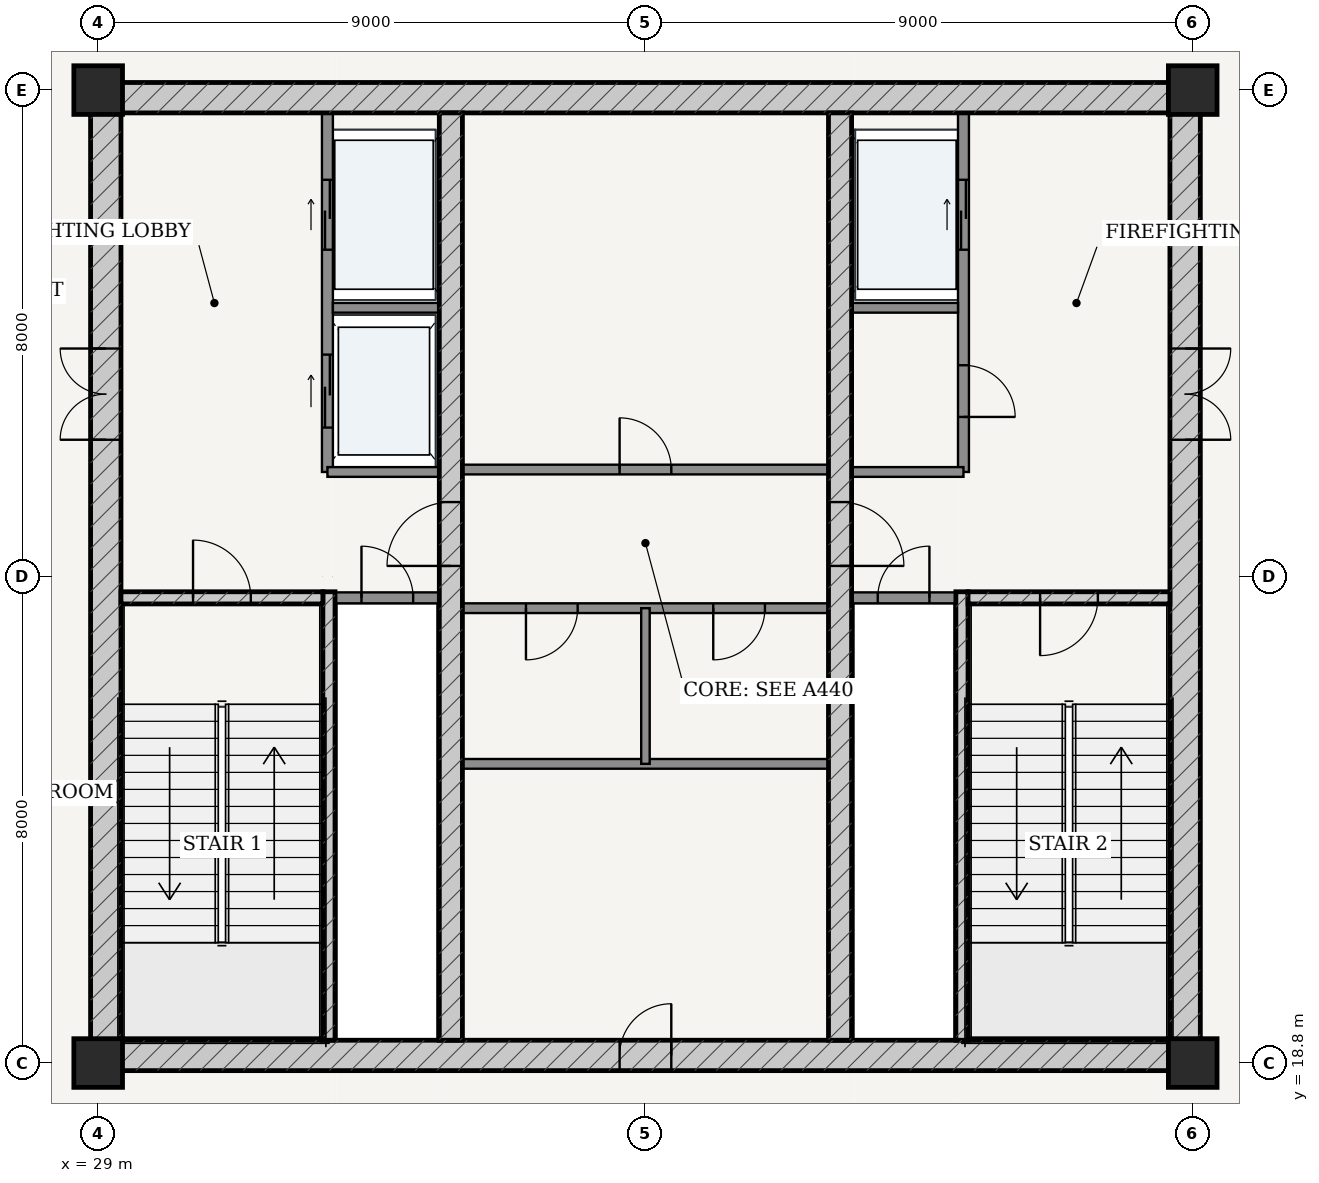
"""IFC4 building model, lengths in metres.
Left out: names, types, materials, properties, quantities, classifications, styles, units other than length and angle.
Written with IfcOpenShell. Run it as: python <this file> out.ifc"""

import sys

from ifc_helpers import new_model, si_unit, direction, frame, frame_2d, origin, origin_2d, place, context, subcontext, project, spatial, rectangle, extrude, source, transform, mapped, element, fill, save


model = new_model("IFC4")
c1 = context("Model", 3, precision=1e-05, world=origin(), true_north=direction((-0.2419218956, 0.970295726276)))
c2 = subcontext(c1, "Body", "Model", "MODEL_VIEW")
j1 = project(units=[si_unit("LENGTHUNIT", "METRE"), si_unit("PLANEANGLEUNIT", "RADIAN")], contexts=[c1])
p1 = place(None, origin())
s1 = spatial("IfcSite", under=j1, at=p1, CompositionType="ELEMENT")
p2 = place(p1, origin())
s2 = spatial("IfcBuilding", under=s1, at=p2, CompositionType="ELEMENT")
p3 = place(p2, frame((0.0, 0.0, 316.5)))
s3 = spatial("IfcBuildingStorey", under=s2, at=p3, CompositionType="ELEMENT", Elevation=316.5)
for number, where, z_axis, x_axis in (
    (1, (29.0, 18.8, 0.0), (0.0, 0.0, 1.0), (1.0, 0.0, 0.0)),
    (2, (47.0, 18.8, 0.0), (0.0, 0.0, 1.0), (1.0, 0.0, 0.0)),
    (3, (47.0, 34.8, 0.0), (0.0, 0.0, 1.0), (1.0, 0.0, 0.0)),
    (4, (29.0, 34.8, 0.0), (0.0, 0.0, 1.0), (1.0, 0.0, 0.0)),
):
    element("IfcColumn", number, at=place(p3, frame(where, z_axis=z_axis, x_axis=x_axis)), inside=s3, PredefinedType="COLUMN", context=c2, shape_type="SweptSolid", body=[
        extrude(rectangle(XDim=0.8, YDim=0.8, at=origin_2d()), origin(), (0.0, 0.0, 1.0), 5.2),
    ])
p4 = place(p3, frame((28.875, 18.925, 0.0), z_axis=(0.0, 0.0, 1.0), x_axis=(1.0, 0.0, 0.0)))
e5 = element("IfcWall", 5, at=p4, inside=s3, PredefinedType="SHEAR", context=c2, shape_type="SweptSolid", body=[
    extrude(rectangle(XDim=18.25, YDim=0.5, at=frame_2d((9.125, 0.0))), origin(), (0.0, 0.0, 1.0), 4.78),
])
p5 = place(p4, frame((8.7, 0.0, 0.0)))
e6 = element("IfcOpeningElement", 6, at=p5, cuts=e5, PredefinedType="OPENING", context=c2, shape_type="SweptSolid", body=[
    extrude(rectangle(XDim=0.85, YDim=2.1, at=frame_2d((0.425, 1.05))), frame((0.0, 0.26, 0.0), z_axis=(0.0, -1.0, 0.0), x_axis=(1.0, 0.0, 0.0)), (0.0, 0.0, 1.0), 0.52),
])
p6 = place(p3, frame((28.875, 34.675, 0.0), z_axis=(0.0, 0.0, 1.0), x_axis=(1.0, 0.0, 0.0)))
e7 = element("IfcWall", 7, at=p6, inside=s3, PredefinedType="SHEAR", context=c2, shape_type="SweptSolid", body=[
    extrude(rectangle(XDim=18.25, YDim=0.5, at=frame_2d((9.125, 0.0))), origin(), (0.0, 0.0, 1.0), 4.78),
])
p7 = place(p3, frame((29.125, 19.175, 0.0), z_axis=(0.0, 0.0, 1.0), x_axis=(0.0, 1.0, 0.0)))
e8 = element("IfcWall", 8, at=p7, inside=s3, PredefinedType="SHEAR", context=c2, shape_type="SweptSolid", body=[
    extrude(rectangle(XDim=15.25, YDim=0.5, at=frame_2d((7.625, 0.0))), origin(), (0.0, 0.0, 1.0), 4.78),
])
p8 = place(p7, frame((9.875, 0.0, 0.0)))
e9 = element("IfcOpeningElement", 9, at=p8, cuts=e8, PredefinedType="OPENING", context=c2, shape_type="SweptSolid", body=[
    extrude(rectangle(XDim=1.5, YDim=2.2, at=frame_2d((0.75, 1.1))), frame((0.0, 0.26, 0.0), z_axis=(0.0, -1.0, 0.0), x_axis=(1.0, 0.0, 0.0)), (0.0, 0.0, 1.0), 0.52),
])
p9 = place(p3, frame((46.875, 19.175, 0.0), z_axis=(0.0, 0.0, 1.0), x_axis=(0.0, 1.0, 0.0)))
e10 = element("IfcWall", 10, at=p9, inside=s3, PredefinedType="SHEAR", context=c2, shape_type="SweptSolid", body=[
    extrude(rectangle(XDim=15.25, YDim=0.5, at=frame_2d((7.625, 0.0))), origin(), (0.0, 0.0, 1.0), 4.78),
])
p10 = place(p9, frame((9.875, 0.0, 0.0)))
e11 = element("IfcOpeningElement", 11, at=p10, cuts=e10, PredefinedType="OPENING", context=c2, shape_type="SweptSolid", body=[
    extrude(rectangle(XDim=1.5, YDim=2.2, at=frame_2d((0.75, 1.1))), frame((0.0, 0.26, 0.0), z_axis=(0.0, -1.0, 0.0), x_axis=(1.0, 0.0, 0.0)), (0.0, 0.0, 1.0), 0.52),
])
p11 = place(p3, frame((32.795, 19.175, 0.0), z_axis=(0.0, 0.0, 1.0), x_axis=(0.0, 1.0, 0.0)))
e12 = element("IfcWall", 12, at=p11, inside=s3, PredefinedType="SOLIDWALL", context=c2, shape_type="SweptSolid", body=[
    extrude(rectangle(XDim=7.375, YDim=0.2, at=frame_2d((3.688, 0.0))), origin(), (0.0, 0.0, 1.0), 4.78),
])
p12 = place(p3, frame((29.375, 26.45, 0.0), z_axis=(0.0, 0.0, 1.0), x_axis=(1.0, 0.0, 0.0)))
e13 = element("IfcWall", 13, at=p12, inside=s3, PredefinedType="SOLIDWALL", context=c2, shape_type="SweptSolid", body=[
    extrude(rectangle(XDim=3.32, YDim=0.2, at=frame_2d((1.66, 0.0))), origin(), (0.0, 0.0, 1.0), 4.78),
])
p13 = place(p12, frame((1.185, 0.0, 0.0)))
e14 = element("IfcOpeningElement", 14, at=p13, cuts=e13, PredefinedType="OPENING", context=c2, shape_type="SweptSolid", body=[
    extrude(rectangle(XDim=0.95, YDim=2.15, at=frame_2d((0.475, 1.075))), frame((0.0, 0.11, 0.0), z_axis=(0.0, -1.0, 0.0), x_axis=(1.0, 0.0, 0.0)), (0.0, 0.0, 1.0), 0.22),
])
p14 = place(p3, frame((43.205, 19.175, 0.0), z_axis=(0.0, 0.0, 1.0), x_axis=(0.0, 1.0, 0.0)))
e15 = element("IfcWall", 15, at=p14, inside=s3, PredefinedType="SOLIDWALL", context=c2, shape_type="SweptSolid", body=[
    extrude(rectangle(XDim=7.375, YDim=0.2, at=frame_2d((3.688, 0.0))), origin(), (0.0, 0.0, 1.0), 4.78),
])
p15 = place(p3, frame((43.305, 26.45, 0.0), z_axis=(0.0, 0.0, 1.0), x_axis=(1.0, 0.0, 0.0)))
e16 = element("IfcWall", 16, at=p15, inside=s3, PredefinedType="SOLIDWALL", context=c2, shape_type="SweptSolid", body=[
    extrude(rectangle(XDim=3.32, YDim=0.2, at=frame_2d((1.66, 0.0))), origin(), (0.0, 0.0, 1.0), 4.78),
])
p16 = place(p15, frame((1.185, 0.0, 0.0)))
e17 = element("IfcOpeningElement", 17, at=p16, cuts=e16, PredefinedType="OPENING", context=c2, shape_type="SweptSolid", body=[
    extrude(rectangle(XDim=0.95, YDim=2.15, at=frame_2d((0.475, 1.075))), frame((0.0, 0.11, 0.0), z_axis=(0.0, -1.0, 0.0), x_axis=(1.0, 0.0, 0.0)), (0.0, 0.0, 1.0), 0.22),
])
p17 = place(p3, frame((34.8, 19.175, 0.0), z_axis=(0.0, 0.0, 1.0), x_axis=(0.0, 1.0, 0.0)))
e18 = element("IfcWall", 18, at=p17, inside=s3, PredefinedType="SHEAR", context=c2, shape_type="SweptSolid", body=[
    extrude(rectangle(XDim=15.25, YDim=0.38, at=frame_2d((7.625, 0.0))), origin(), (0.0, 0.0, 1.0), 4.78),
])
p18 = place(p17, frame((7.8, 0.0, 0.0)))
e19 = element("IfcOpeningElement", 19, at=p18, cuts=e18, PredefinedType="OPENING", context=c2, shape_type="SweptSolid", body=[
    extrude(rectangle(XDim=1.05, YDim=2.15, at=frame_2d((0.525, 1.075))), frame((0.0, 0.2, 0.0), z_axis=(0.0, -1.0, 0.0), x_axis=(1.0, 0.0, 0.0)), (0.0, 0.0, 1.0), 0.4),
])
p19 = place(p3, frame((41.2, 19.175, 0.0), z_axis=(0.0, 0.0, 1.0), x_axis=(0.0, 1.0, 0.0)))
e20 = element("IfcWall", 20, at=p19, inside=s3, PredefinedType="SHEAR", context=c2, shape_type="SweptSolid", body=[
    extrude(rectangle(XDim=15.25, YDim=0.38, at=frame_2d((7.625, 0.0))), origin(), (0.0, 0.0, 1.0), 4.78),
])
p20 = place(p19, frame((7.8, 0.0, 0.0)))
e21 = element("IfcOpeningElement", 21, at=p20, cuts=e20, PredefinedType="OPENING", context=c2, shape_type="SweptSolid", body=[
    extrude(rectangle(XDim=1.05, YDim=2.15, at=frame_2d((0.525, 1.075))), frame((0.0, 0.2, 0.0), z_axis=(0.0, -1.0, 0.0), x_axis=(1.0, 0.0, 0.0)), (0.0, 0.0, 1.0), 0.4),
])
p21 = place(p3, frame((32.9, 26.45, 0.0), z_axis=(0.0, 0.0, 1.0), x_axis=(1.0, 0.0, 0.0)))
e22 = element("IfcWall", 22, at=p21, inside=s3, PredefinedType="PARTITIONING", context=c2, shape_type="SweptSolid", body=[
    extrude(rectangle(XDim=1.71, YDim=0.18, at=frame_2d((0.855, 0.0))), origin(), (0.0, 0.0, 1.0), 4.78),
])
p22 = place(p21, frame((0.43, 0.0, 0.0)))
e23 = element("IfcOpeningElement", 23, at=p22, cuts=e22, PredefinedType="OPENING", context=c2, shape_type="SweptSolid", body=[
    extrude(rectangle(XDim=0.85, YDim=2.1, at=frame_2d((0.425, 1.05))), frame((0.0, 0.1, 0.0), z_axis=(0.0, -1.0, 0.0), x_axis=(1.0, 0.0, 0.0)), (0.0, 0.0, 1.0), 0.2),
])
p23 = place(p3, frame((41.39, 26.45, 0.0), z_axis=(0.0, 0.0, 1.0), x_axis=(1.0, 0.0, 0.0)))
e24 = element("IfcWall", 24, at=p23, inside=s3, PredefinedType="PARTITIONING", context=c2, shape_type="SweptSolid", body=[
    extrude(rectangle(XDim=1.71, YDim=0.18, at=frame_2d((0.855, 0.0))), origin(), (0.0, 0.0, 1.0), 4.78),
])
p24 = place(p23, frame((0.43, 0.0, 0.0)))
e25 = element("IfcOpeningElement", 25, at=p24, cuts=e24, PredefinedType="OPENING", context=c2, shape_type="SweptSolid", body=[
    extrude(rectangle(XDim=0.85, YDim=2.1, at=frame_2d((0.425, 1.05))), frame((0.0, 0.1, 0.0), z_axis=(0.0, -1.0, 0.0), x_axis=(1.0, 0.0, 0.0)), (0.0, 0.0, 1.0), 0.2),
])
p25 = place(p3, frame((32.77, 28.52, 0.0), z_axis=(0.0, 0.0, 1.0), x_axis=(0.0, 1.0, 0.0)))
e26 = element("IfcWall", 26, at=p25, inside=s3, PredefinedType="PARTITIONING", context=c2, shape_type="SweptSolid", body=[
    extrude(rectangle(XDim=5.905, YDim=0.18, at=frame_2d((2.953, 0.0))), origin(), (0.0, 0.0, 1.0), 4.78),
])
p26 = place(p25, frame((3.655, 0.0, 0.0)))
e27 = element("IfcOpeningElement", 27, at=p26, cuts=e26, PredefinedType="OPENING", context=c2, shape_type="SweptSolid", body=[
    extrude(rectangle(XDim=1.15, YDim=2.2, at=frame_2d((0.575, 1.1))), frame((0.0, 0.1, 0.0), z_axis=(0.0, -1.0, 0.0), x_axis=(1.0, 0.0, 0.0)), (0.0, 0.0, 1.0), 0.2),
])
p27 = place(p25, frame((0.73, 0.0, 0.0)))
e28 = element("IfcOpeningElement", 28, at=p27, cuts=e26, PredefinedType="OPENING", context=c2, shape_type="SweptSolid", body=[
    extrude(rectangle(XDim=1.2, YDim=2.25, at=frame_2d((0.6, 1.125))), frame((0.0, 0.1, 0.0), z_axis=(0.0, -1.0, 0.0), x_axis=(1.0, 0.0, 0.0)), (0.0, 0.0, 1.0), 0.2),
])
p28 = place(p3, frame((32.86, 31.22, 0.0), z_axis=(0.0, 0.0, 1.0), x_axis=(1.0, 0.0, 0.0)))
e29 = element("IfcWall", 29, at=p28, inside=s3, PredefinedType="PARTITIONING", context=c2, shape_type="SweptSolid", body=[
    extrude(rectangle(XDim=1.75, YDim=0.16, at=frame_2d((0.875, 0.0))), origin(), (0.0, 0.0, 1.0), 4.78),
])
p29 = place(p3, frame((32.77, 28.52, 0.0), z_axis=(0.0, 0.0, 1.0), x_axis=(1.0, 0.0, 0.0)))
e30 = element("IfcWall", 30, at=p29, inside=s3, PredefinedType="PARTITIONING", context=c2, shape_type="SweptSolid", body=[
    extrude(rectangle(XDim=1.84, YDim=0.16, at=frame_2d((0.92, 0.0))), origin(), (0.0, 0.0, 1.0), 4.78),
])
p30 = place(p3, frame((43.23, 28.52, 0.0), z_axis=(0.0, 0.0, 1.0), x_axis=(0.0, 1.0, 0.0)))
e31 = element("IfcWall", 31, at=p30, inside=s3, PredefinedType="PARTITIONING", context=c2, shape_type="SweptSolid", body=[
    extrude(rectangle(XDim=5.905, YDim=0.18, at=frame_2d((2.953, 0.0))), origin(), (0.0, 0.0, 1.0), 4.78),
])
p31 = place(p30, frame((0.905, 0.0, 0.0)))
e32 = element("IfcOpeningElement", 32, at=p31, cuts=e31, PredefinedType="OPENING", context=c2, shape_type="SweptSolid", body=[
    extrude(rectangle(XDim=0.85, YDim=2.1, at=frame_2d((0.425, 1.05))), frame((0.0, 0.1, 0.0), z_axis=(0.0, -1.0, 0.0), x_axis=(1.0, 0.0, 0.0)), (0.0, 0.0, 1.0), 0.2),
])
p32 = place(p30, frame((3.655, 0.0, 0.0)))
e33 = element("IfcOpeningElement", 33, at=p32, cuts=e31, PredefinedType="OPENING", context=c2, shape_type="SweptSolid", body=[
    extrude(rectangle(XDim=1.15, YDim=2.2, at=frame_2d((0.575, 1.1))), frame((0.0, 0.1, 0.0), z_axis=(0.0, -1.0, 0.0), x_axis=(1.0, 0.0, 0.0)), (0.0, 0.0, 1.0), 0.2),
])
p33 = place(p3, frame((41.39, 31.22, 0.0), z_axis=(0.0, 0.0, 1.0), x_axis=(1.0, 0.0, 0.0)))
e34 = element("IfcWall", 34, at=p33, inside=s3, PredefinedType="PARTITIONING", context=c2, shape_type="SweptSolid", body=[
    extrude(rectangle(XDim=1.75, YDim=0.16, at=frame_2d((0.875, 0.0))), origin(), (0.0, 0.0, 1.0), 4.78),
])
p34 = place(p3, frame((41.39, 28.52, 0.0), z_axis=(0.0, 0.0, 1.0), x_axis=(1.0, 0.0, 0.0)))
e35 = element("IfcWall", 35, at=p34, inside=s3, PredefinedType="PARTITIONING", context=c2, shape_type="SweptSolid", body=[
    extrude(rectangle(XDim=1.84, YDim=0.16, at=frame_2d((0.92, 0.0))), origin(), (0.0, 0.0, 1.0), 4.78),
])
p35 = place(p3, frame((34.99, 28.56, 0.0), z_axis=(0.0, 0.0, 1.0), x_axis=(1.0, 0.0, 0.0)))
e36 = element("IfcWall", 36, at=p35, inside=s3, PredefinedType="PARTITIONING", context=c2, shape_type="SweptSolid", body=[
    extrude(rectangle(XDim=6.02, YDim=0.16, at=frame_2d((3.01, 0.0))), origin(), (0.0, 0.0, 1.0), 4.78),
])
p36 = place(p35, frame((2.585, 0.0, 0.0)))
e37 = element("IfcOpeningElement", 37, at=p36, cuts=e36, PredefinedType="OPENING", context=c2, shape_type="SweptSolid", body=[
    extrude(rectangle(XDim=0.85, YDim=2.1, at=frame_2d((0.425, 1.05))), frame((0.0, 0.09, 0.0), z_axis=(0.0, -1.0, 0.0), x_axis=(1.0, 0.0, 0.0)), (0.0, 0.0, 1.0), 0.18),
])
p37 = place(p3, frame((34.99, 26.28, 0.0), z_axis=(0.0, 0.0, 1.0), x_axis=(1.0, 0.0, 0.0)))
e38 = element("IfcWall", 38, at=p37, inside=s3, PredefinedType="PARTITIONING", context=c2, shape_type="SweptSolid", body=[
    extrude(rectangle(XDim=6.02, YDim=0.16, at=frame_2d((3.01, 0.0))), origin(), (0.0, 0.0, 1.0), 4.78),
])
p38 = place(p37, frame((1.045, 0.0, 0.0)))
e39 = element("IfcOpeningElement", 39, at=p38, cuts=e38, PredefinedType="OPENING", context=c2, shape_type="SweptSolid", body=[
    extrude(rectangle(XDim=0.85, YDim=2.1, at=frame_2d((0.425, 1.05))), frame((0.0, 0.09, 0.0), z_axis=(0.0, -1.0, 0.0), x_axis=(1.0, 0.0, 0.0)), (0.0, 0.0, 1.0), 0.18),
])
p39 = place(p37, frame((4.125, 0.0, 0.0)))
e40 = element("IfcOpeningElement", 40, at=p39, cuts=e38, PredefinedType="OPENING", context=c2, shape_type="SweptSolid", body=[
    extrude(rectangle(XDim=0.85, YDim=2.1, at=frame_2d((0.425, 1.05))), frame((0.0, 0.09, 0.0), z_axis=(0.0, -1.0, 0.0), x_axis=(1.0, 0.0, 0.0)), (0.0, 0.0, 1.0), 0.18),
])
p40 = place(p3, frame((34.99, 23.72, 0.0), z_axis=(0.0, 0.0, 1.0), x_axis=(1.0, 0.0, 0.0)))
e41 = element("IfcWall", 41, at=p40, inside=s3, PredefinedType="PARTITIONING", context=c2, shape_type="SweptSolid", body=[
    extrude(rectangle(XDim=6.02, YDim=0.16, at=frame_2d((3.01, 0.0))), origin(), (0.0, 0.0, 1.0), 4.78),
])
p41 = place(p3, frame((38.0, 23.72, 0.0), z_axis=(0.0, 0.0, 1.0), x_axis=(0.0, 1.0, 0.0)))
e42 = element("IfcWall", 42, at=p41, inside=s3, PredefinedType="PARTITIONING", context=c2, shape_type="SweptSolid", body=[
    extrude(rectangle(XDim=2.56, YDim=0.14, at=frame_2d((1.28, 0.0))), origin(), (0.0, 0.0, 1.0), 4.78),
])
m1 = source(origin(), c2, "Body", "SweptSolid", [
    extrude(rectangle(XDim=1.5, YDim=2.2, at=frame_2d((0.75, 1.1))), frame((0.0, 0.025, 0.0), z_axis=(0.0, -1.0, 0.0), x_axis=(1.0, 0.0, 0.0)), (0.0, 0.0, 1.0), 0.05),
])
p42 = place(p8, origin())
e43 = element("IfcDoor", 43, at=p42, inside=s3, OperationType="DOUBLE_DOOR_SINGLE_SWING", PredefinedType="DOOR", context=c2, shape_type="MappedRepresentation", body=[
    mapped(m1, transform((0.0, 0.0, 0.0), scale=1.0)),
])
fill(e9, e43)
p43 = place(p10, frame((1.5, 0.0, 0.0), z_axis=(0.0, 0.0, 1.0), x_axis=(-1.0, 0.0, 0.0)))
e44 = element("IfcDoor", 44, at=p43, inside=s3, OperationType="DOUBLE_DOOR_SINGLE_SWING", PredefinedType="DOOR", context=c2, shape_type="MappedRepresentation", body=[
    mapped(m1, transform((0.0, 0.0, 0.0), scale=1.0)),
])
fill(e11, e44)
m2 = source(origin(), c2, "Body", "SweptSolid", [
    extrude(rectangle(XDim=1.05, YDim=2.15, at=frame_2d((0.525, 1.075))), frame((0.0, 0.025, 0.0), z_axis=(0.0, -1.0, 0.0), x_axis=(1.0, 0.0, 0.0)), (0.0, 0.0, 1.0), 0.05),
])
p44 = place(p18, origin())
e45 = element("IfcDoor", 45, at=p44, inside=s3, OperationType="SINGLE_SWING_LEFT", PredefinedType="DOOR", context=c2, shape_type="MappedRepresentation", body=[
    mapped(m2, transform((0.0, 0.0, 0.0), scale=1.0)),
])
fill(e19, e45)
p45 = place(p20, frame((1.05, 0.0, 0.0), z_axis=(0.0, 0.0, 1.0), x_axis=(-1.0, 0.0, 0.0)))
e46 = element("IfcDoor", 46, at=p45, inside=s3, OperationType="SINGLE_SWING_RIGHT", PredefinedType="DOOR", context=c2, shape_type="MappedRepresentation", body=[
    mapped(m2, transform((0.0, 0.0, 0.0), scale=1.0)),
])
fill(e21, e46)
m3 = source(origin(), c2, "Body", "SweptSolid", [
    extrude(rectangle(XDim=0.95, YDim=2.15, at=frame_2d((0.475, 1.075))), frame((0.0, 0.025, 0.0), z_axis=(0.0, -1.0, 0.0), x_axis=(1.0, 0.0, 0.0)), (0.0, 0.0, 1.0), 0.05),
])
p46 = place(p13, origin())
e47 = element("IfcDoor", 47, at=p46, inside=s3, OperationType="SINGLE_SWING_LEFT", PredefinedType="DOOR", context=c2, shape_type="MappedRepresentation", body=[
    mapped(m3, transform((0.0, 0.0, 0.0), scale=1.0)),
])
fill(e14, e47)
p47 = place(p16, frame((0.95, 0.0, 0.0), z_axis=(0.0, 0.0, 1.0), x_axis=(-1.0, 0.0, 0.0)))
e48 = element("IfcDoor", 48, at=p47, inside=s3, OperationType="SINGLE_SWING_RIGHT", PredefinedType="DOOR", context=c2, shape_type="MappedRepresentation", body=[
    mapped(m3, transform((0.0, 0.0, 0.0), scale=1.0)),
])
fill(e17, e48)
m4 = source(origin(), c2, "Body", "SweptSolid", [
    extrude(rectangle(XDim=0.85, YDim=2.1, at=frame_2d((0.425, 1.05))), frame((0.0, 0.025, 0.0), z_axis=(0.0, -1.0, 0.0), x_axis=(1.0, 0.0, 0.0)), (0.0, 0.0, 1.0), 0.05),
])
p48 = place(p22, origin())
e49 = element("IfcDoor", 49, at=p48, inside=s3, OperationType="SINGLE_SWING_LEFT", PredefinedType="DOOR", context=c2, shape_type="MappedRepresentation", body=[
    mapped(m4, transform((0.0, 0.0, 0.0), scale=1.0)),
])
fill(e23, e49)
p49 = place(p24, origin())
e50 = element("IfcDoor", 50, at=p49, inside=s3, OperationType="SINGLE_SWING_RIGHT", PredefinedType="DOOR", context=c2, shape_type="MappedRepresentation", body=[
    mapped(m4, transform((0.0, 0.0, 0.0), scale=1.0)),
])
fill(e25, e50)
p50 = place(p31, frame((0.85, 0.0, 0.0), z_axis=(0.0, 0.0, 1.0), x_axis=(-1.0, 0.0, 0.0)))
e51 = element("IfcDoor", 51, at=p50, inside=s3, OperationType="SINGLE_SWING_RIGHT", PredefinedType="DOOR", context=c2, shape_type="MappedRepresentation", body=[
    mapped(m4, transform((0.0, 0.0, 0.0), scale=1.0)),
])
fill(e32, e51)
p51 = place(p36, origin())
e52 = element("IfcDoor", 52, at=p51, inside=s3, OperationType="SINGLE_SWING_LEFT", PredefinedType="DOOR", context=c2, shape_type="MappedRepresentation", body=[
    mapped(m4, transform((0.0, 0.0, 0.0), scale=1.0)),
])
fill(e37, e52)
p52 = place(p38, frame((0.85, 0.0, 0.0), z_axis=(0.0, 0.0, 1.0), x_axis=(-1.0, 0.0, 0.0)))
e53 = element("IfcDoor", 53, at=p52, inside=s3, OperationType="SINGLE_SWING_RIGHT", PredefinedType="DOOR", context=c2, shape_type="MappedRepresentation", body=[
    mapped(m4, transform((0.0, 0.0, 0.0), scale=1.0)),
])
fill(e39, e53)
p53 = place(p39, frame((0.85, 0.0, 0.0), z_axis=(0.0, 0.0, 1.0), x_axis=(-1.0, 0.0, 0.0)))
e54 = element("IfcDoor", 54, at=p53, inside=s3, OperationType="SINGLE_SWING_RIGHT", PredefinedType="DOOR", context=c2, shape_type="MappedRepresentation", body=[
    mapped(m4, transform((0.0, 0.0, 0.0), scale=1.0)),
])
fill(e40, e54)
p54 = place(p5, origin())
e55 = element("IfcDoor", 55, at=p54, inside=s3, OperationType="SINGLE_SWING_RIGHT", PredefinedType="DOOR", context=c2, shape_type="MappedRepresentation", body=[
    mapped(m4, transform((0.0, 0.0, 0.0), scale=1.0)),
])
fill(e6, e55)
m5 = source(origin(), c2, "Body", "SweptSolid", [
    extrude(rectangle(XDim=1.15, YDim=2.2, at=frame_2d((0.575, 1.1))), frame((0.0, 0.025, 0.0), z_axis=(0.0, -1.0, 0.0), x_axis=(1.0, 0.0, 0.0)), (0.0, 0.0, 1.0), 0.05),
])
p55 = place(p26, origin())
e56 = element("IfcDoor", 56, at=p55, inside=s3, OperationType="DOUBLE_DOOR_SLIDING", PredefinedType="DOOR", context=c2, shape_type="MappedRepresentation", body=[
    mapped(m5, transform((0.0, 0.0, 0.0), scale=1.0)),
])
fill(e27, e56)
p56 = place(p32, origin())
e57 = element("IfcDoor", 57, at=p56, inside=s3, OperationType="DOUBLE_DOOR_SLIDING", PredefinedType="DOOR", context=c2, shape_type="MappedRepresentation", body=[
    mapped(m5, transform((0.0, 0.0, 0.0), scale=1.0)),
])
fill(e33, e57)
m6 = source(origin(), c2, "Body", "SweptSolid", [
    extrude(rectangle(XDim=1.2, YDim=2.25, at=frame_2d((0.6, 1.125))), frame((0.0, 0.025, 0.0), z_axis=(0.0, -1.0, 0.0), x_axis=(1.0, 0.0, 0.0)), (0.0, 0.0, 1.0), 0.05),
])
p57 = place(p27, origin())
e58 = element("IfcDoor", 58, at=p57, inside=s3, OperationType="DOUBLE_DOOR_SLIDING", PredefinedType="DOOR", context=c2, shape_type="MappedRepresentation", body=[
    mapped(m6, transform((0.0, 0.0, 0.0), scale=1.0)),
])
fill(e28, e58)
save(model, sys.argv[1])
